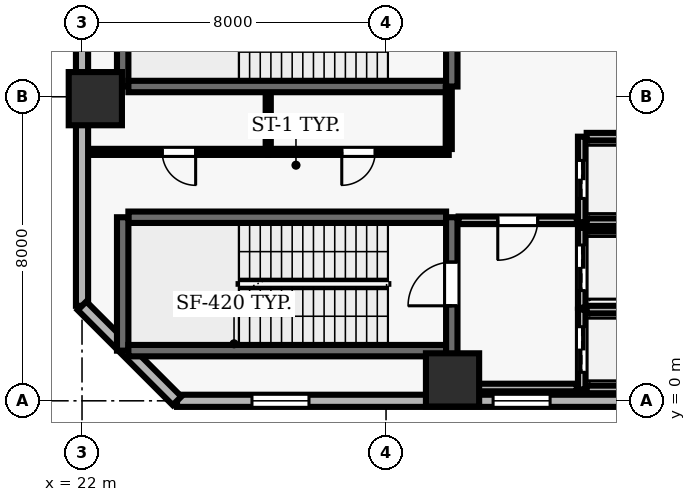
"""IFC4 building model, lengths in metres.
Left out: names, types, materials, properties, quantities, classifications, styles, units other than length and angle.
Written with IfcOpenShell. Run it as: python <this file> out.ifc"""

import sys

from ifc_helpers import new_model, si_unit, direction, frame, frame_2d, origin, origin_2d, place, context, subcontext, project, spatial, rectangle, extrude, element, fill, save


model = new_model("IFC4")
c1 = context("Model", 3, precision=1e-05, world=origin(), true_north=direction((0.0, 1.0)))
c2 = subcontext(c1, "Body", "Model", "MODEL_VIEW")
j1 = project(units=[si_unit("LENGTHUNIT", "METRE"), si_unit("PLANEANGLEUNIT", "RADIAN")], contexts=[c1])
p1 = place(None, origin())
s1 = spatial("IfcSite", under=j1, at=p1, CompositionType="ELEMENT")
p2 = place(p1, origin())
s2 = spatial("IfcBuilding", under=s1, at=p2, CompositionType="ELEMENT")
p3 = place(p2, frame((0.0, 0.0, 26.0)))
s3 = spatial("IfcBuildingStorey", under=s2, at=p3, CompositionType="ELEMENT", Elevation=26.0)
for number, where, z_axis, x_axis in (
    (1, (31.75, 0.55, 0.0), (0.0, 0.0, 1.0), (1.0, 0.0, 0.0)),
    (2, (22.35, 7.95, 0.0), (0.0, 0.0, 1.0), (1.0, 0.0, 0.0)),
):
    element("IfcColumn", number, at=place(p3, frame(where, z_axis=z_axis, x_axis=x_axis)), inside=s3, PredefinedType="COLUMN", context=c2, shape_type="SweptSolid", body=[
        extrude(rectangle(XDim=1.4, YDim=1.4, at=origin_2d()), origin(), (0.0, 0.0, 1.0), 5.0),
    ])
p4 = place(p3, frame((24.5, 0.0, 0.0), z_axis=(0.0, 0.0, 1.0), x_axis=(1.0, 0.0, 0.0)))
e3 = element("IfcWall", 3, at=p4, inside=s3, PredefinedType="SOLIDWALL", context=c2, shape_type="SweptSolid", body=[
    extrude(rectangle(XDim=49.0, YDim=0.32, at=frame_2d((24.5, 0.0))), origin(), (0.0, 0.0, 1.0), 4.79),
])
p5 = place(p4, frame((1.972, 0.0, 0.9)))
e4 = element("IfcOpeningElement", 4, at=p5, cuts=e3, PredefinedType="OPENING", context=c2, shape_type="SweptSolid", body=[
    extrude(rectangle(XDim=1.5, YDim=1.8, at=frame_2d((0.75, 0.9))), frame((0.0, 0.17, 0.0), z_axis=(0.0, -1.0, 0.0), x_axis=(1.0, 0.0, 0.0)), (0.0, 0.0, 1.0), 0.34),
])
p6 = place(p4, frame((8.317, 0.0, 0.9)))
e5 = element("IfcOpeningElement", 5, at=p6, cuts=e3, PredefinedType="OPENING", context=c2, shape_type="SweptSolid", body=[
    extrude(rectangle(XDim=1.5, YDim=1.8, at=frame_2d((0.75, 0.9))), frame((0.0, 0.17, 0.0), z_axis=(0.0, -1.0, 0.0), x_axis=(1.0, 0.0, 0.0)), (0.0, 0.0, 1.0), 0.34),
])
p7 = place(p4, frame((18.306, 0.0, 0.9)))
e6 = element("IfcOpeningElement", 6, at=p7, cuts=e3, PredefinedType="OPENING", context=c2, shape_type="SweptSolid", body=[
    extrude(rectangle(XDim=1.5, YDim=1.8, at=frame_2d((0.75, 0.9))), frame((0.0, 0.17, 0.0), z_axis=(0.0, -1.0, 0.0), x_axis=(1.0, 0.0, 0.0)), (0.0, 0.0, 1.0), 0.34),
])
p8 = place(p4, frame((29.194, 0.0, 0.9)))
e7 = element("IfcOpeningElement", 7, at=p8, cuts=e3, PredefinedType="OPENING", context=c2, shape_type="SweptSolid", body=[
    extrude(rectangle(XDim=1.5, YDim=1.8, at=frame_2d((0.75, 0.9))), frame((0.0, 0.17, 0.0), z_axis=(0.0, -1.0, 0.0), x_axis=(1.0, 0.0, 0.0)), (0.0, 0.0, 1.0), 0.34),
])
p9 = place(p4, frame((34.639, 0.0, 0.9)))
e8 = element("IfcOpeningElement", 8, at=p9, cuts=e3, PredefinedType="OPENING", context=c2, shape_type="SweptSolid", body=[
    extrude(rectangle(XDim=1.5, YDim=1.8, at=frame_2d((0.75, 0.9))), frame((0.0, 0.17, 0.0), z_axis=(0.0, -1.0, 0.0), x_axis=(1.0, 0.0, 0.0)), (0.0, 0.0, 1.0), 0.34),
])
p10 = place(p4, frame((40.083, 0.0, 0.9)))
e9 = element("IfcOpeningElement", 9, at=p10, cuts=e3, PredefinedType="OPENING", context=c2, shape_type="SweptSolid", body=[
    extrude(rectangle(XDim=1.5, YDim=1.8, at=frame_2d((0.75, 0.9))), frame((0.0, 0.17, 0.0), z_axis=(0.0, -1.0, 0.0), x_axis=(1.0, 0.0, 0.0)), (0.0, 0.0, 1.0), 0.34),
])
p11 = place(p4, frame((45.528, 0.0, 0.9)))
e10 = element("IfcOpeningElement", 10, at=p11, cuts=e3, PredefinedType="OPENING", context=c2, shape_type="SweptSolid", body=[
    extrude(rectangle(XDim=1.5, YDim=1.8, at=frame_2d((0.75, 0.9))), frame((0.0, 0.17, 0.0), z_axis=(0.0, -1.0, 0.0), x_axis=(1.0, 0.0, 0.0)), (0.0, 0.0, 1.0), 0.34),
])
p12 = place(p3, frame((22.0, 51.5, 0.0), z_axis=(0.0, 0.0, 1.0), x_axis=(0.0, -1.0, 0.0)))
e11 = element("IfcWall", 11, at=p12, inside=s3, PredefinedType="SOLIDWALL", context=c2, shape_type="SweptSolid", body=[
    extrude(rectangle(XDim=49.0, YDim=0.32, at=frame_2d((24.5, 0.0))), origin(), (0.0, 0.0, 1.0), 4.79),
])
p13 = place(p12, frame((12.1, 0.0, 0.0)))
e12 = element("IfcOpeningElement", 12, at=p13, cuts=e11, PredefinedType="OPENING", context=c2, shape_type="SweptSolid", body=[
    extrude(rectangle(XDim=1.0, YDim=2.2, at=frame_2d((0.5, 1.1))), frame((0.0, 0.17, 0.0), z_axis=(0.0, -1.0, 0.0), x_axis=(1.0, 0.0, 0.0)), (0.0, 0.0, 1.0), 0.34),
])
p14 = place(p12, frame((1.972, 0.0, 0.9)))
e13 = element("IfcOpeningElement", 13, at=p14, cuts=e11, PredefinedType="OPENING", context=c2, shape_type="SweptSolid", body=[
    extrude(rectangle(XDim=1.5, YDim=1.8, at=frame_2d((0.75, 0.9))), frame((0.0, 0.17, 0.0), z_axis=(0.0, -1.0, 0.0), x_axis=(1.0, 0.0, 0.0)), (0.0, 0.0, 1.0), 0.34),
])
p15 = place(p12, frame((7.867, 0.0, 0.9)))
e14 = element("IfcOpeningElement", 14, at=p15, cuts=e11, PredefinedType="OPENING", context=c2, shape_type="SweptSolid", body=[
    extrude(rectangle(XDim=1.5, YDim=1.8, at=frame_2d((0.75, 0.9))), frame((0.0, 0.17, 0.0), z_axis=(0.0, -1.0, 0.0), x_axis=(1.0, 0.0, 0.0)), (0.0, 0.0, 1.0), 0.34),
])
p16 = place(p12, frame((18.306, 0.0, 0.9)))
e15 = element("IfcOpeningElement", 15, at=p16, cuts=e11, PredefinedType="OPENING", context=c2, shape_type="SweptSolid", body=[
    extrude(rectangle(XDim=1.5, YDim=1.8, at=frame_2d((0.75, 0.9))), frame((0.0, 0.17, 0.0), z_axis=(0.0, -1.0, 0.0), x_axis=(1.0, 0.0, 0.0)), (0.0, 0.0, 1.0), 0.34),
])
p17 = place(p12, frame((23.3, 0.0, 0.9)))
e16 = element("IfcOpeningElement", 16, at=p17, cuts=e11, PredefinedType="OPENING", context=c2, shape_type="SweptSolid", body=[
    extrude(rectangle(XDim=1.5, YDim=1.8, at=frame_2d((0.75, 0.9))), frame((0.0, 0.17, 0.0), z_axis=(0.0, -1.0, 0.0), x_axis=(1.0, 0.0, 0.0)), (0.0, 0.0, 1.0), 0.34),
])
p18 = place(p12, frame((29.194, 0.0, 0.9)))
e17 = element("IfcOpeningElement", 17, at=p18, cuts=e11, PredefinedType="OPENING", context=c2, shape_type="SweptSolid", body=[
    extrude(rectangle(XDim=1.5, YDim=1.8, at=frame_2d((0.75, 0.9))), frame((0.0, 0.17, 0.0), z_axis=(0.0, -1.0, 0.0), x_axis=(1.0, 0.0, 0.0)), (0.0, 0.0, 1.0), 0.34),
])
p19 = place(p12, frame((34.189, 0.0, 0.9)))
e18 = element("IfcOpeningElement", 18, at=p19, cuts=e11, PredefinedType="OPENING", context=c2, shape_type="SweptSolid", body=[
    extrude(rectangle(XDim=1.5, YDim=1.8, at=frame_2d((0.75, 0.9))), frame((0.0, 0.17, 0.0), z_axis=(0.0, -1.0, 0.0), x_axis=(1.0, 0.0, 0.0)), (0.0, 0.0, 1.0), 0.34),
])
p20 = place(p12, frame((40.083, 0.0, 0.9)))
e19 = element("IfcOpeningElement", 19, at=p20, cuts=e11, PredefinedType="OPENING", context=c2, shape_type="SweptSolid", body=[
    extrude(rectangle(XDim=1.5, YDim=1.8, at=frame_2d((0.75, 0.9))), frame((0.0, 0.17, 0.0), z_axis=(0.0, -1.0, 0.0), x_axis=(1.0, 0.0, 0.0)), (0.0, 0.0, 1.0), 0.34),
])
p21 = place(p3, frame((22.0, 2.5, 0.0), z_axis=(0.0, 0.0, 1.0), x_axis=(0.707106781187, -0.707106781187, 0.0)))
e20 = element("IfcWall", 20, at=p21, inside=s3, PredefinedType="SOLIDWALL", context=c2, shape_type="SweptSolid", body=[
    extrude(rectangle(XDim=3.536, YDim=0.32, at=frame_2d((1.768, 0.0))), origin(), (0.0, 0.0, 1.0), 4.79),
])
p22 = place(p3, frame((31.58, 4.83, 0.0), z_axis=(0.0, 0.0, 1.0), x_axis=(-1.0, 0.0, 0.0)))
e21 = element("IfcWall", 21, at=p22, inside=s3, PredefinedType="SHEAR", context=c2, shape_type="SweptSolid", body=[
    extrude(rectangle(XDim=8.36, YDim=0.3, at=frame_2d((4.18, 0.0))), origin(), (0.0, 0.0, 1.0), 4.79),
])
p23 = place(p3, frame((23.07, 4.83, 0.0), z_axis=(0.0, 0.0, 1.0), x_axis=(0.0, -1.0, 0.0)))
e22 = element("IfcWall", 22, at=p23, inside=s3, PredefinedType="SHEAR", context=c2, shape_type="SweptSolid", body=[
    extrude(rectangle(XDim=3.51, YDim=0.3, at=frame_2d((1.755, 0.0))), origin(), (0.0, 0.0, 1.0), 4.79),
])
p24 = place(p3, frame((23.22, 1.32, 0.0), z_axis=(0.0, 0.0, 1.0), x_axis=(1.0, 0.0, 0.0)))
e23 = element("IfcWall", 23, at=p24, inside=s3, PredefinedType="SHEAR", context=c2, shape_type="SweptSolid", body=[
    extrude(rectangle(XDim=8.36, YDim=0.3, at=frame_2d((4.18, 0.0))), origin(), (0.0, 0.0, 1.0), 4.79),
])
p25 = place(p3, frame((31.73, 0.96, 0.0), z_axis=(0.0, 0.0, 1.0), x_axis=(0.0, 1.0, 0.0)))
e24 = element("IfcWall", 24, at=p25, inside=s3, PredefinedType="SHEAR", context=c2, shape_type="SweptSolid", body=[
    extrude(rectangle(XDim=3.87, YDim=0.3, at=frame_2d((1.935, 0.0))), origin(), (0.0, 0.0, 1.0), 4.79),
])
p26 = place(p25, frame((1.54, 0.0, 0.0)))
e25 = element("IfcOpeningElement", 25, at=p26, cuts=e24, PredefinedType="OPENING", context=c2, shape_type="SweptSolid", body=[
    extrude(rectangle(XDim=1.15, YDim=2.15, at=frame_2d((0.575, 1.075))), frame((0.0, 0.16, 0.0), z_axis=(0.0, -1.0, 0.0), x_axis=(1.0, 0.0, 0.0)), (0.0, 0.0, 1.0), 0.32),
])
p27 = place(p3, frame((23.07, 11.78, 0.0), z_axis=(0.0, 0.0, 1.0), x_axis=(0.0, -1.0, 0.0)))
e26 = element("IfcWall", 26, at=p27, inside=s3, PredefinedType="SHEAR", context=c2, shape_type="SweptSolid", body=[
    extrude(rectangle(XDim=3.51, YDim=0.3, at=frame_2d((1.755, 0.0))), origin(), (0.0, 0.0, 1.0), 4.79),
])
p28 = place(p3, frame((23.22, 8.27, 0.0), z_axis=(0.0, 0.0, 1.0), x_axis=(1.0, 0.0, 0.0)))
e27 = element("IfcWall", 27, at=p28, inside=s3, PredefinedType="SHEAR", context=c2, shape_type="SweptSolid", body=[
    extrude(rectangle(XDim=8.36, YDim=0.3, at=frame_2d((4.18, 0.0))), origin(), (0.0, 0.0, 1.0), 4.79),
])
p29 = place(p3, frame((31.73, 8.27, 0.0), z_axis=(0.0, 0.0, 1.0), x_axis=(0.0, 1.0, 0.0)))
e28 = element("IfcWall", 28, at=p29, inside=s3, PredefinedType="SHEAR", context=c2, shape_type="SweptSolid", body=[
    extrude(rectangle(XDim=3.51, YDim=0.3, at=frame_2d((1.755, 0.0))), origin(), (0.0, 0.0, 1.0), 4.79),
])
p30 = place(p29, frame((1.18, 0.0, 0.0)))
e29 = element("IfcOpeningElement", 29, at=p30, cuts=e28, PredefinedType="OPENING", context=c2, shape_type="SweptSolid", body=[
    extrude(rectangle(XDim=1.15, YDim=2.15, at=frame_2d((0.575, 1.075))), frame((0.0, 0.16, 0.0), z_axis=(0.0, -1.0, 0.0), x_axis=(1.0, 0.0, 0.0)), (0.0, 0.0, 1.0), 0.32),
])
p31 = place(p3, frame((35.15, 2.4, 0.0), z_axis=(0.0, 0.0, 1.0), x_axis=(0.0, -1.0, 0.0)))
e30 = element("IfcWall", 30, at=p31, inside=s3, PredefinedType="SOLIDWALL", context=c2, shape_type="SweptSolid", body=[
    extrude(rectangle(XDim=2.1, YDim=0.2, at=frame_2d((1.05, 0.0))), origin(), (0.0, 0.0, 1.0), 4.79),
])
p32 = place(p31, frame((0.45, 0.0, 0.0)))
e31 = element("IfcOpeningElement", 31, at=p32, cuts=e30, PredefinedType="OPENING", context=c2, shape_type="SweptSolid", body=[
    extrude(rectangle(XDim=1.2, YDim=2.15, at=frame_2d((0.6, 1.075))), frame((0.0, 0.11, 0.0), z_axis=(0.0, -1.0, 0.0), x_axis=(1.0, 0.0, 0.0)), (0.0, 0.0, 1.0), 0.22),
])
for number, where, z_axis, x_axis in (
    (32, (35.28, 0.3, 0.0), (0.0, 0.0, 1.0), (1.0, 0.0, 0.0)),
    (33, (37.42, 2.4, 0.0), (0.0, 0.0, 1.0), (-1.0, 0.0, 0.0)),
):
    element("IfcWall", number, at=place(p3, frame(where, z_axis=z_axis, x_axis=x_axis)), inside=s3, PredefinedType="SOLIDWALL", context=c2, shape_type="SweptSolid", body=[
        extrude(rectangle(XDim=2.14, YDim=0.2, at=frame_2d((1.07, 0.0))), origin(), (0.0, 0.0, 1.0), 4.79),
    ])
p33 = place(p3, frame((35.15, 4.55, 0.0), z_axis=(0.0, 0.0, 1.0), x_axis=(0.0, -1.0, 0.0)))
e34 = element("IfcWall", 34, at=p33, inside=s3, PredefinedType="SOLIDWALL", context=c2, shape_type="SweptSolid", body=[
    extrude(rectangle(XDim=2.1, YDim=0.2, at=frame_2d((1.05, 0.0))), origin(), (0.0, 0.0, 1.0), 4.79),
])
p34 = place(p33, frame((0.45, 0.0, 0.0)))
e35 = element("IfcOpeningElement", 35, at=p34, cuts=e34, PredefinedType="OPENING", context=c2, shape_type="SweptSolid", body=[
    extrude(rectangle(XDim=1.2, YDim=2.15, at=frame_2d((0.6, 1.075))), frame((0.0, 0.11, 0.0), z_axis=(0.0, -1.0, 0.0), x_axis=(1.0, 0.0, 0.0)), (0.0, 0.0, 1.0), 0.22),
])
p35 = place(p3, frame((37.42, 4.55, 0.0), z_axis=(0.0, 0.0, 1.0), x_axis=(-1.0, 0.0, 0.0)))
e36 = element("IfcWall", 36, at=p35, inside=s3, PredefinedType="SOLIDWALL", context=c2, shape_type="SweptSolid", body=[
    extrude(rectangle(XDim=2.14, YDim=0.2, at=frame_2d((1.07, 0.0))), origin(), (0.0, 0.0, 1.0), 4.79),
])
p36 = place(p3, frame((35.15, 6.95, 0.0), z_axis=(0.0, 0.0, 1.0), x_axis=(0.0, -1.0, 0.0)))
e37 = element("IfcWall", 37, at=p36, inside=s3, PredefinedType="SOLIDWALL", context=c2, shape_type="SweptSolid", body=[
    extrude(rectangle(XDim=2.25, YDim=0.2, at=frame_2d((1.125, 0.0))), origin(), (0.0, 0.0, 1.0), 4.79),
])
p37 = place(p36, frame((0.625, 0.0, 0.0)))
e38 = element("IfcOpeningElement", 38, at=p37, cuts=e37, PredefinedType="OPENING", context=c2, shape_type="SweptSolid", body=[
    extrude(rectangle(XDim=1.0, YDim=2.1, at=frame_2d((0.5, 1.05))), frame((0.0, 0.11, 0.0), z_axis=(0.0, -1.0, 0.0), x_axis=(1.0, 0.0, 0.0)), (0.0, 0.0, 1.0), 0.22),
])
for number, where, z_axis, x_axis in (
    (39, (35.28, 4.7, 0.0), (0.0, 0.0, 1.0), (1.0, 0.0, 0.0)),
    (40, (37.42, 6.95, 0.0), (0.0, 0.0, 1.0), (-1.0, 0.0, 0.0)),
):
    element("IfcWall", number, at=place(p3, frame(where, z_axis=z_axis, x_axis=x_axis)), inside=s3, PredefinedType="SOLIDWALL", context=c2, shape_type="SweptSolid", body=[
        extrude(rectangle(XDim=2.14, YDim=0.2, at=frame_2d((1.07, 0.0))), origin(), (0.0, 0.0, 1.0), 4.79),
    ])
p38 = place(p3, frame((26.9, 6.55, 0.0), z_axis=(0.0, 0.0, 1.0), x_axis=(-1.0, 0.0, 0.0)))
e41 = element("IfcWall", 41, at=p38, inside=s3, PredefinedType="PARTITIONING", context=c2, shape_type="SweptSolid", body=[
    extrude(rectangle(XDim=4.7, YDim=0.16, at=frame_2d((2.35, 0.0))), origin(), (0.0, 0.0, 1.0), 4.79),
])
p39 = place(p38, frame((1.91, 0.0, 0.0)))
e42 = element("IfcOpeningElement", 42, at=p39, cuts=e41, PredefinedType="OPENING", context=c2, shape_type="SweptSolid", body=[
    extrude(rectangle(XDim=0.88, YDim=2.1, at=frame_2d((0.44, 1.05))), frame((0.0, 0.09, 0.0), z_axis=(0.0, -1.0, 0.0), x_axis=(1.0, 0.0, 0.0)), (0.0, 0.0, 1.0), 0.18),
])
p40 = place(p3, frame((31.65, 0.35, 0.0), z_axis=(0.0, 0.0, 1.0), x_axis=(1.0, 0.0, 0.0)))
e43 = element("IfcWall", 43, at=p40, inside=s3, PredefinedType="SOLIDWALL", context=c2, shape_type="SweptSolid", body=[
    extrude(rectangle(XDim=3.37, YDim=0.2, at=frame_2d((1.685, 0.0))), origin(), (0.0, 0.0, 1.0), 4.79),
])
p41 = place(p3, frame((31.65, 6.55, 0.0), z_axis=(0.0, 0.0, 1.0), x_axis=(-1.0, 0.0, 0.0)))
e44 = element("IfcWall", 44, at=p41, inside=s3, PredefinedType="PARTITIONING", context=c2, shape_type="SweptSolid", body=[
    extrude(rectangle(XDim=4.75, YDim=0.16, at=frame_2d((2.375, 0.0))), origin(), (0.0, 0.0, 1.0), 4.79),
])
p42 = place(p41, frame((1.935, 0.0, 0.0)))
e45 = element("IfcOpeningElement", 45, at=p42, cuts=e44, PredefinedType="OPENING", context=c2, shape_type="SweptSolid", body=[
    extrude(rectangle(XDim=0.88, YDim=2.1, at=frame_2d((0.44, 1.05))), frame((0.0, 0.09, 0.0), z_axis=(0.0, -1.0, 0.0), x_axis=(1.0, 0.0, 0.0)), (0.0, 0.0, 1.0), 0.18),
])
p43 = place(p3, frame((35.02, 4.75, 0.0), z_axis=(0.0, 0.0, 1.0), x_axis=(-1.0, 0.0, 0.0)))
e46 = element("IfcWall", 46, at=p43, inside=s3, PredefinedType="SOLIDWALL", context=c2, shape_type="SweptSolid", body=[
    extrude(rectangle(XDim=3.11, YDim=0.2, at=frame_2d((1.555, 0.0))), origin(), (0.0, 0.0, 1.0), 4.79),
])
p44 = place(p43, frame((1.03, 0.0, 0.0)))
e47 = element("IfcOpeningElement", 47, at=p44, cuts=e46, PredefinedType="OPENING", context=c2, shape_type="SweptSolid", body=[
    extrude(rectangle(XDim=1.05, YDim=2.15, at=frame_2d((0.525, 1.075))), frame((0.0, 0.11, 0.0), z_axis=(0.0, -1.0, 0.0), x_axis=(1.0, 0.0, 0.0)), (0.0, 0.0, 1.0), 0.22),
])
p45 = place(p3, frame((26.9, 6.625, 0.0), z_axis=(0.0, 0.0, 1.0), x_axis=(0.0, 1.0, 0.0)))
e48 = element("IfcWall", 48, at=p45, inside=s3, PredefinedType="PARTITIONING", context=c2, shape_type="SweptSolid", body=[
    extrude(rectangle(XDim=1.465, YDim=0.135, at=frame_2d((0.732, 0.0))), origin(), (0.0, 0.0, 1.0), 4.79),
])
p46 = place(p3, frame((31.65, 8.24, 0.0), z_axis=(0.0, 0.0, 1.0), x_axis=(0.0, -1.0, 0.0)))
e49 = element("IfcWall", 49, at=p46, inside=s3, PredefinedType="PARTITIONING", context=c2, shape_type="SweptSolid", body=[
    extrude(rectangle(XDim=1.615, YDim=0.16, at=frame_2d((0.808, 0.0))), origin(), (0.0, 0.0, 1.0), 4.79),
])
p47 = place(p5, origin())
e50 = element("IfcWindow", 50, at=p47, inside=s3, PartitioningType="SINGLE_PANEL", PredefinedType="WINDOW", context=c2, shape_type="SweptSolid", body=[
    extrude(rectangle(XDim=1.5, YDim=1.8, at=frame_2d((0.75, 0.9))), frame((0.0, 0.03, 0.0), z_axis=(0.0, -1.0, 0.0), x_axis=(1.0, 0.0, 0.0)), (0.0, 0.0, 1.0), 0.06),
])
fill(e4, e50)
p48 = place(p6, origin())
e51 = element("IfcWindow", 51, at=p48, inside=s3, PartitioningType="SINGLE_PANEL", PredefinedType="WINDOW", context=c2, shape_type="SweptSolid", body=[
    extrude(rectangle(XDim=1.5, YDim=1.8, at=frame_2d((0.75, 0.9))), frame((0.0, 0.03, 0.0), z_axis=(0.0, -1.0, 0.0), x_axis=(1.0, 0.0, 0.0)), (0.0, 0.0, 1.0), 0.06),
])
fill(e5, e51)
p49 = place(p26, origin())
e52 = element("IfcDoor", 52, at=p49, inside=s3, OperationType="SINGLE_SWING_LEFT", PredefinedType="DOOR", context=c2, shape_type="SweptSolid", body=[
    extrude(rectangle(XDim=1.15, YDim=2.15, at=frame_2d((0.575, 1.075))), frame((0.0, 0.025, 0.0), z_axis=(0.0, -1.0, 0.0), x_axis=(1.0, 0.0, 0.0)), (0.0, 0.0, 1.0), 0.05),
])
fill(e25, e52)
p50 = place(p32, origin())
e53 = element("IfcDoor", 53, at=p50, inside=s3, OperationType="DOUBLE_DOOR_SLIDING", PredefinedType="DOOR", context=c2, shape_type="SweptSolid", body=[
    extrude(rectangle(XDim=1.2, YDim=2.15, at=frame_2d((0.6, 1.075))), frame((0.0, 0.025, 0.0), z_axis=(0.0, -1.0, 0.0), x_axis=(1.0, 0.0, 0.0)), (0.0, 0.0, 1.0), 0.05),
])
fill(e31, e53)
p51 = place(p34, origin())
e54 = element("IfcDoor", 54, at=p51, inside=s3, OperationType="DOUBLE_DOOR_SLIDING", PredefinedType="DOOR", context=c2, shape_type="SweptSolid", body=[
    extrude(rectangle(XDim=1.2, YDim=2.15, at=frame_2d((0.6, 1.075))), frame((0.0, 0.025, 0.0), z_axis=(0.0, -1.0, 0.0), x_axis=(1.0, 0.0, 0.0)), (0.0, 0.0, 1.0), 0.05),
])
fill(e35, e54)
p52 = place(p37, origin())
e55 = element("IfcDoor", 55, at=p52, inside=s3, OperationType="DOUBLE_DOOR_SLIDING", PredefinedType="DOOR", context=c2, shape_type="SweptSolid", body=[
    extrude(rectangle(XDim=1.0, YDim=2.1, at=frame_2d((0.5, 1.05))), frame((0.0, 0.025, 0.0), z_axis=(0.0, -1.0, 0.0), x_axis=(1.0, 0.0, 0.0)), (0.0, 0.0, 1.0), 0.05),
])
fill(e38, e55)
p53 = place(p44, origin())
e56 = element("IfcDoor", 56, at=p53, inside=s3, OperationType="SINGLE_SWING_RIGHT", PredefinedType="DOOR", context=c2, shape_type="SweptSolid", body=[
    extrude(rectangle(XDim=1.05, YDim=2.15, at=frame_2d((0.525, 1.075))), frame((0.0, 0.025, 0.0), z_axis=(0.0, -1.0, 0.0), x_axis=(1.0, 0.0, 0.0)), (0.0, 0.0, 1.0), 0.05),
])
fill(e47, e56)
p54 = place(p39, origin())
e57 = element("IfcDoor", 57, at=p54, inside=s3, OperationType="SINGLE_SWING_LEFT", PredefinedType="DOOR", context=c2, shape_type="SweptSolid", body=[
    extrude(rectangle(XDim=0.88, YDim=2.1, at=frame_2d((0.44, 1.05))), frame((0.0, 0.025, 0.0), z_axis=(0.0, -1.0, 0.0), x_axis=(1.0, 0.0, 0.0)), (0.0, 0.0, 1.0), 0.05),
])
fill(e42, e57)
p55 = place(p42, origin())
e58 = element("IfcDoor", 58, at=p55, inside=s3, OperationType="SINGLE_SWING_RIGHT", PredefinedType="DOOR", context=c2, shape_type="SweptSolid", body=[
    extrude(rectangle(XDim=0.88, YDim=2.1, at=frame_2d((0.44, 1.05))), frame((0.0, 0.025, 0.0), z_axis=(0.0, -1.0, 0.0), x_axis=(1.0, 0.0, 0.0)), (0.0, 0.0, 1.0), 0.05),
])
fill(e45, e58)
save(model, sys.argv[1])
